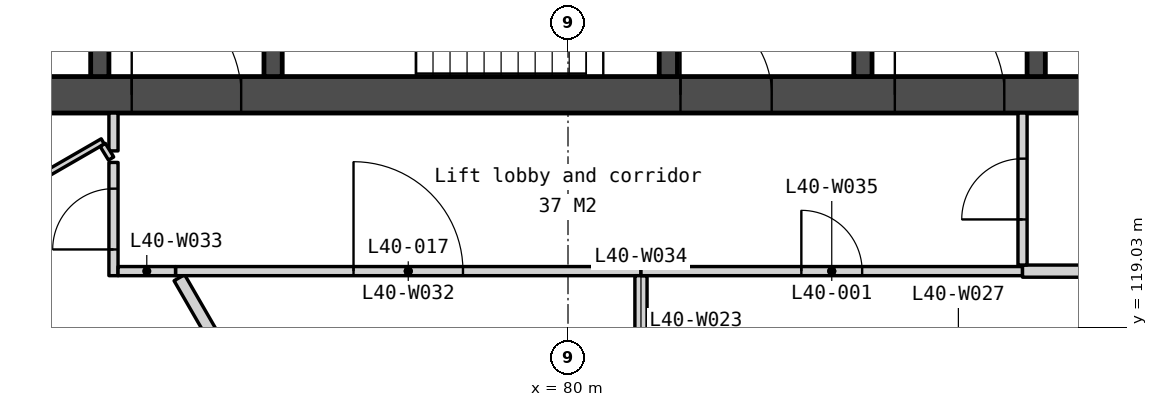
"""IFC4 building model, lengths in metres.
Left out: names, types, materials, properties, quantities, classifications, styles, units other than length and angle.
Written with IfcOpenShell. Run it as: python <this file> out.ifc"""

import sys

from ifc_helpers import new_model, si_unit, direction, frame, frame_2d, origin, place, context, subcontext, project, spatial, polyline, rectangle, outline, extrude, element, fill, save


model = new_model("IFC4")
c1 = context("Model", 3, precision=1e-05, world=origin(), true_north=direction((0.0, 1.0)))
c2 = subcontext(c1, "Body", "Model", "MODEL_VIEW")
j1 = project(units=[si_unit("LENGTHUNIT", "METRE"), si_unit("PLANEANGLEUNIT", "RADIAN")], contexts=[c1])
p1 = place(None, origin())
s1 = spatial("IfcSite", under=j1, at=p1, CompositionType="ELEMENT")
p2 = place(p1, origin())
s2 = spatial("IfcBuilding", under=s1, at=p2, CompositionType="ELEMENT")
p3 = place(p2, frame((0.0, 0.0, 159.8)))
s3 = spatial("IfcBuildingStorey", under=s2, at=p3, CompositionType="ELEMENT", Elevation=159.8)
p4 = place(p3, frame((69.0, 122.85, 0.0), z_axis=(0.0, 0.0, 1.0), x_axis=(1.0, 0.0, 0.0)))
e1 = element("IfcWall", 1, at=p4, inside=s3, PredefinedType="SOLIDWALL", context=c2, shape_type="SweptSolid", body=[
    extrude(rectangle(XDim=22.0, YDim=0.6, at=frame_2d((11.0, 0.0))), origin(), (0.0, 0.0, 1.0), 3.75),
])
p5 = place(p4, frame((16.375, 0.0, 0.0)))
e2 = element("IfcOpeningElement", 2, at=p5, cuts=e1, PredefinedType="OPENING", context=c2, shape_type="SweptSolid", body=[
    extrude(rectangle(XDim=1.8, YDim=2.1, at=frame_2d((0.9, 1.05))), frame((0.0, 0.31, 0.0), z_axis=(0.0, -1.0, 0.0), x_axis=(1.0, 0.0, 0.0)), (0.0, 0.0, 1.0), 0.62),
])
p6 = place(p4, frame((3.825, 0.0, 0.0)))
e3 = element("IfcOpeningElement", 3, at=p6, cuts=e1, PredefinedType="OPENING", context=c2, shape_type="SweptSolid", body=[
    extrude(rectangle(XDim=1.8, YDim=2.1, at=frame_2d((0.9, 1.05))), frame((0.0, 0.31, 0.0), z_axis=(0.0, -1.0, 0.0), x_axis=(1.0, 0.0, 0.0)), (0.0, 0.0, 1.0), 0.62),
])
p7 = place(p4, frame((12.85, 0.0, 0.0)))
e4 = element("IfcOpeningElement", 4, at=p7, cuts=e1, PredefinedType="OPENING", context=c2, shape_type="SweptSolid", body=[
    extrude(rectangle(XDim=1.5, YDim=2.1, at=frame_2d((0.75, 1.05))), frame((0.0, 0.31, 0.0), z_axis=(0.0, -1.0, 0.0), x_axis=(1.0, 0.0, 0.0)), (0.0, 0.0, 1.0), 0.62),
])
p8 = place(p3, frame((72.3, 133.95, 0.0), z_axis=(0.0, 0.0, 1.0), x_axis=(0.0, -1.0, 0.0)))
e5 = element("IfcWall", 5, at=p8, inside=s3, PredefinedType="SOLIDWALL", context=c2, shape_type="SweptSolid", body=[
    extrude(rectangle(XDim=10.8, YDim=0.3, at=frame_2d((5.4, 0.0))), origin(), (0.0, 0.0, 1.0), 3.75),
])
p9 = place(p8, frame((6.95, 0.0, 0.0)))
e6 = element("IfcOpeningElement", 6, at=p9, cuts=e5, PredefinedType="OPENING", context=c2, shape_type="SweptSolid", body=[
    extrude(rectangle(XDim=1.1, YDim=2.1, at=frame_2d((0.55, 1.05))), frame((0.0, 0.16, 0.0), z_axis=(0.0, -1.0, 0.0), x_axis=(1.0, 0.0, 0.0)), (0.0, 0.0, 1.0), 0.32),
])
p10 = place(p8, frame((9.35, 0.0, 0.0)))
e7 = element("IfcOpeningElement", 7, at=p10, cuts=e5, PredefinedType="OPENING", context=c2, shape_type="SweptSolid", body=[
    extrude(rectangle(XDim=0.9, YDim=2.1, at=frame_2d((0.45, 1.05))), frame((0.0, 0.16, 0.0), z_axis=(0.0, -1.0, 0.0), x_axis=(1.0, 0.0, 0.0)), (0.0, 0.0, 1.0), 0.32),
])
p11 = place(p8, frame((5.1, 0.0, 0.0)))
e8 = element("IfcOpeningElement", 8, at=p11, cuts=e5, PredefinedType="OPENING", context=c2, shape_type="SweptSolid", body=[
    extrude(rectangle(XDim=1.0, YDim=2.1, at=frame_2d((0.5, 1.05))), frame((0.0, 0.16, 0.0), z_axis=(0.0, -1.0, 0.0), x_axis=(1.0, 0.0, 0.0)), (0.0, 0.0, 1.0), 0.32),
])
p12 = place(p3, frame((75.15, 125.7, 0.0), z_axis=(0.0, 0.0, 1.0), x_axis=(0.0, -1.0, 0.0)))
e9 = element("IfcWall", 9, at=p12, inside=s3, PredefinedType="SOLIDWALL", context=c2, shape_type="SweptSolid", body=[
    extrude(rectangle(XDim=2.55, YDim=0.3, at=frame_2d((1.275, 0.0))), origin(), (0.0, 0.0, 1.0), 3.75),
])
p13 = place(p3, frame((81.65, 125.7, 0.0), z_axis=(0.0, 0.0, 1.0), x_axis=(0.0, -1.0, 0.0)))
e10 = element("IfcWall", 10, at=p13, inside=s3, PredefinedType="SOLIDWALL", context=c2, shape_type="SweptSolid", body=[
    extrude(rectangle(XDim=2.55, YDim=0.3, at=frame_2d((1.275, 0.0))), origin(), (0.0, 0.0, 1.0), 3.75),
])
p14 = place(p13, frame((0.75, 0.0, 0.0)))
e11 = element("IfcOpeningElement", 11, at=p14, cuts=e10, PredefinedType="OPENING", context=c2, shape_type="SweptSolid", body=[
    extrude(rectangle(XDim=1.0, YDim=2.1, at=frame_2d((0.5, 1.05))), frame((0.0, 0.16, 0.0), z_axis=(0.0, -1.0, 0.0), x_axis=(1.0, 0.0, 0.0)), (0.0, 0.0, 1.0), 0.32),
])
p15 = place(p3, frame((84.85, 125.85, 0.0), z_axis=(0.0, 0.0, 1.0), x_axis=(0.0, -1.0, 0.0)))
e12 = element("IfcWall", 12, at=p15, inside=s3, PredefinedType="SOLIDWALL", context=c2, shape_type="SweptSolid", body=[
    extrude(rectangle(XDim=2.7, YDim=0.3, at=frame_2d((1.35, 0.0))), origin(), (0.0, 0.0, 1.0), 3.75),
])
p16 = place(p3, frame((87.7, 133.95, 0.0), z_axis=(0.0, 0.0, 1.0), x_axis=(0.0, -1.0, 0.0)))
e13 = element("IfcWall", 13, at=p16, inside=s3, PredefinedType="SOLIDWALL", context=c2, shape_type="SweptSolid", body=[
    extrude(rectangle(XDim=10.8, YDim=0.3, at=frame_2d((5.4, 0.0))), origin(), (0.0, 0.0, 1.0), 3.75),
])
p17 = place(p16, frame((6.95, 0.0, 0.0)))
e14 = element("IfcOpeningElement", 14, at=p17, cuts=e13, PredefinedType="OPENING", context=c2, shape_type="SweptSolid", body=[
    extrude(rectangle(XDim=1.1, YDim=2.1, at=frame_2d((0.55, 1.05))), frame((0.0, 0.16, 0.0), z_axis=(0.0, -1.0, 0.0), x_axis=(1.0, 0.0, 0.0)), (0.0, 0.0, 1.0), 0.32),
])
p18 = place(p16, frame((5.1, 0.0, 0.0)))
e15 = element("IfcOpeningElement", 15, at=p18, cuts=e13, PredefinedType="OPENING", context=c2, shape_type="SweptSolid", body=[
    extrude(rectangle(XDim=1.0, YDim=2.1, at=frame_2d((0.5, 1.05))), frame((0.0, 0.16, 0.0), z_axis=(0.0, -1.0, 0.0), x_axis=(1.0, 0.0, 0.0)), (0.0, 0.0, 1.0), 0.32),
])
p19 = place(p16, frame((9.25, 0.0, 0.0)))
e16 = element("IfcOpeningElement", 16, at=p19, cuts=e13, PredefinedType="OPENING", context=c2, shape_type="SweptSolid", body=[
    extrude(rectangle(XDim=1.1, YDim=2.1, at=frame_2d((0.55, 1.05))), frame((0.0, 0.16, 0.0), z_axis=(0.0, -1.0, 0.0), x_axis=(1.0, 0.0, 0.0)), (0.0, 0.0, 1.0), 0.32),
])
p20 = place(p3, frame((57.652, 131.129, -0.15), z_axis=(0.0, 0.0, 1.0), x_axis=(0.499997369791, -0.866026922331, 0.0)))
e17 = element("IfcWall", 17, at=p20, inside=s3, PredefinedType="SOLIDWALL", context=c2, shape_type="SweptSolid", body=[
    extrude(outline(polyline([(40.486, 0.0), (40.486, 3.9), (0.0, 3.9), (0.0, 0.0), (40.486, 0.0)])), frame((0.0, 0.225, 0.0), z_axis=(0.0, -1.0, 0.0), x_axis=(1.0, 0.0, 0.0)), (0.0, 0.0, 1.0), 0.45),
])
p21 = place(p20, frame((3.011, 0.0, 0.95)))
e18 = element("IfcOpeningElement", 18, at=p21, cuts=e17, PredefinedType="OPENING", context=c2, shape_type="SweptSolid", body=[
    extrude(rectangle(XDim=1.8, YDim=2.2, at=frame_2d((0.9, 1.1))), frame((0.0, 0.235, 0.0), z_axis=(0.0, -1.0, 0.0), x_axis=(1.0, 0.0, 0.0)), (0.0, 0.0, 1.0), 0.47),
])
p22 = place(p20, frame((5.311, 0.0, 0.95)))
e19 = element("IfcOpeningElement", 19, at=p22, cuts=e17, PredefinedType="OPENING", context=c2, shape_type="SweptSolid", body=[
    extrude(rectangle(XDim=1.8, YDim=2.2, at=frame_2d((0.9, 1.1))), frame((0.0, 0.235, 0.0), z_axis=(0.0, -1.0, 0.0), x_axis=(1.0, 0.0, 0.0)), (0.0, 0.0, 1.0), 0.47),
])
p23 = place(p20, frame((13.132, 0.0, 0.95)))
e20 = element("IfcOpeningElement", 20, at=p23, cuts=e17, PredefinedType="OPENING", context=c2, shape_type="SweptSolid", body=[
    extrude(rectangle(XDim=1.8, YDim=2.2, at=frame_2d((0.9, 1.1))), frame((0.0, 0.235, 0.0), z_axis=(0.0, -1.0, 0.0), x_axis=(1.0, 0.0, 0.0)), (0.0, 0.0, 1.0), 0.47),
])
p24 = place(p20, frame((15.432, 0.0, 0.95)))
e21 = element("IfcOpeningElement", 21, at=p24, cuts=e17, PredefinedType="OPENING", context=c2, shape_type="SweptSolid", body=[
    extrude(rectangle(XDim=1.8, YDim=2.2, at=frame_2d((0.9, 1.1))), frame((0.0, 0.235, 0.0), z_axis=(0.0, -1.0, 0.0), x_axis=(1.0, 0.0, 0.0)), (0.0, 0.0, 1.0), 0.47),
])
p25 = place(p20, frame((23.254, 0.0, 0.95)))
e22 = element("IfcOpeningElement", 22, at=p25, cuts=e17, PredefinedType="OPENING", context=c2, shape_type="SweptSolid", body=[
    extrude(rectangle(XDim=1.8, YDim=2.2, at=frame_2d((0.9, 1.1))), frame((0.0, 0.235, 0.0), z_axis=(0.0, -1.0, 0.0), x_axis=(1.0, 0.0, 0.0)), (0.0, 0.0, 1.0), 0.47),
])
p26 = place(p20, frame((25.554, 0.0, 0.95)))
e23 = element("IfcOpeningElement", 23, at=p26, cuts=e17, PredefinedType="OPENING", context=c2, shape_type="SweptSolid", body=[
    extrude(rectangle(XDim=1.8, YDim=2.2, at=frame_2d((0.9, 1.1))), frame((0.0, 0.235, 0.0), z_axis=(0.0, -1.0, 0.0), x_axis=(1.0, 0.0, 0.0)), (0.0, 0.0, 1.0), 0.47),
])
p27 = place(p20, frame((33.375, 0.0, 0.95)))
e24 = element("IfcOpeningElement", 24, at=p27, cuts=e17, PredefinedType="OPENING", context=c2, shape_type="SweptSolid", body=[
    extrude(rectangle(XDim=1.8, YDim=2.2, at=frame_2d((0.9, 1.1))), frame((0.0, 0.235, 0.0), z_axis=(0.0, -1.0, 0.0), x_axis=(1.0, 0.0, 0.0)), (0.0, 0.0, 1.0), 0.47),
])
p28 = place(p20, frame((35.675, 0.0, 0.95)))
e25 = element("IfcOpeningElement", 25, at=p28, cuts=e17, PredefinedType="OPENING", context=c2, shape_type="SweptSolid", body=[
    extrude(rectangle(XDim=1.8, YDim=2.2, at=frame_2d((0.9, 1.1))), frame((0.0, 0.235, 0.0), z_axis=(0.0, -1.0, 0.0), x_axis=(1.0, 0.0, 0.0)), (0.0, 0.0, 1.0), 0.47),
])
p29 = place(p3, frame((82.105, 96.067, -0.15), z_axis=(0.0, 0.0, 1.0), x_axis=(0.499997369791, 0.866026922331, 0.0)))
e26 = element("IfcWall", 26, at=p29, inside=s3, PredefinedType="SOLIDWALL", context=c2, shape_type="SweptSolid", body=[
    extrude(outline(polyline([(40.486, 0.0), (40.486, 3.9), (0.0, 3.9), (0.0, 0.0), (40.486, 0.0)])), frame((0.0, 0.225, 0.0), z_axis=(0.0, -1.0, 0.0), x_axis=(1.0, 0.0, 0.0)), (0.0, 0.0, 1.0), 0.45),
])
p30 = place(p29, frame((3.011, 0.0, 0.95)))
e27 = element("IfcOpeningElement", 27, at=p30, cuts=e26, PredefinedType="OPENING", context=c2, shape_type="SweptSolid", body=[
    extrude(rectangle(XDim=1.8, YDim=2.2, at=frame_2d((0.9, 1.1))), frame((0.0, 0.235, 0.0), z_axis=(0.0, -1.0, 0.0), x_axis=(1.0, 0.0, 0.0)), (0.0, 0.0, 1.0), 0.47),
])
p31 = place(p29, frame((5.311, 0.0, 0.95)))
e28 = element("IfcOpeningElement", 28, at=p31, cuts=e26, PredefinedType="OPENING", context=c2, shape_type="SweptSolid", body=[
    extrude(rectangle(XDim=1.8, YDim=2.2, at=frame_2d((0.9, 1.1))), frame((0.0, 0.235, 0.0), z_axis=(0.0, -1.0, 0.0), x_axis=(1.0, 0.0, 0.0)), (0.0, 0.0, 1.0), 0.47),
])
p32 = place(p29, frame((13.132, 0.0, 0.95)))
e29 = element("IfcOpeningElement", 29, at=p32, cuts=e26, PredefinedType="OPENING", context=c2, shape_type="SweptSolid", body=[
    extrude(rectangle(XDim=1.8, YDim=2.2, at=frame_2d((0.9, 1.1))), frame((0.0, 0.235, 0.0), z_axis=(0.0, -1.0, 0.0), x_axis=(1.0, 0.0, 0.0)), (0.0, 0.0, 1.0), 0.47),
])
p33 = place(p29, frame((15.432, 0.0, 0.95)))
e30 = element("IfcOpeningElement", 30, at=p33, cuts=e26, PredefinedType="OPENING", context=c2, shape_type="SweptSolid", body=[
    extrude(rectangle(XDim=1.8, YDim=2.2, at=frame_2d((0.9, 1.1))), frame((0.0, 0.235, 0.0), z_axis=(0.0, -1.0, 0.0), x_axis=(1.0, 0.0, 0.0)), (0.0, 0.0, 1.0), 0.47),
])
p34 = place(p29, frame((23.254, 0.0, 0.95)))
e31 = element("IfcOpeningElement", 31, at=p34, cuts=e26, PredefinedType="OPENING", context=c2, shape_type="SweptSolid", body=[
    extrude(rectangle(XDim=1.8, YDim=2.2, at=frame_2d((0.9, 1.1))), frame((0.0, 0.235, 0.0), z_axis=(0.0, -1.0, 0.0), x_axis=(1.0, 0.0, 0.0)), (0.0, 0.0, 1.0), 0.47),
])
p35 = place(p29, frame((25.554, 0.0, 0.95)))
e32 = element("IfcOpeningElement", 32, at=p35, cuts=e26, PredefinedType="OPENING", context=c2, shape_type="SweptSolid", body=[
    extrude(rectangle(XDim=1.8, YDim=2.2, at=frame_2d((0.9, 1.1))), frame((0.0, 0.235, 0.0), z_axis=(0.0, -1.0, 0.0), x_axis=(1.0, 0.0, 0.0)), (0.0, 0.0, 1.0), 0.47),
])
p36 = place(p29, frame((33.375, 0.0, 0.95)))
e33 = element("IfcOpeningElement", 33, at=p36, cuts=e26, PredefinedType="OPENING", context=c2, shape_type="SweptSolid", body=[
    extrude(rectangle(XDim=1.8, YDim=2.2, at=frame_2d((0.9, 1.1))), frame((0.0, 0.235, 0.0), z_axis=(0.0, -1.0, 0.0), x_axis=(1.0, 0.0, 0.0)), (0.0, 0.0, 1.0), 0.47),
])
p37 = place(p29, frame((35.675, 0.0, 0.95)))
e34 = element("IfcOpeningElement", 34, at=p37, cuts=e26, PredefinedType="OPENING", context=c2, shape_type="SweptSolid", body=[
    extrude(rectangle(XDim=1.8, YDim=2.2, at=frame_2d((0.9, 1.1))), frame((0.0, 0.235, 0.0), z_axis=(0.0, -1.0, 0.0), x_axis=(1.0, 0.0, 0.0)), (0.0, 0.0, 1.0), 0.47),
])
p38 = place(p3, frame((73.608, 119.842, 0.0), z_axis=(0.0, 0.0, 1.0), x_axis=(0.50001949124, -0.86601415022, 0.0)))
e35 = element("IfcWall", 35, at=p38, inside=s3, PredefinedType="PARTITIONING", context=c2, shape_type="SweptSolid", body=[
    extrude(rectangle(XDim=2.49, YDim=0.2, at=frame_2d((1.245, 0.0))), origin(), (0.0, 0.0, 1.0), 3.75),
])
p39 = place(p3, frame((65.438, 118.093, 0.0), z_axis=(0.0, 0.0, 1.0), x_axis=(0.866026120082, 0.499998759335, 0.0)))
e36 = element("IfcWall", 36, at=p39, inside=s3, PredefinedType="PARTITIONING", context=c2, shape_type="SweptSolid", body=[
    extrude(rectangle(XDim=7.98, YDim=0.1, at=frame_2d((3.99, 0.0))), origin(), (0.0, 0.0, 1.0), 3.75),
])
p40 = place(p39, frame((3.54, 0.0, 0.0)))
e37 = element("IfcOpeningElement", 37, at=p40, cuts=e36, PredefinedType="OPENING", context=c2, shape_type="SweptSolid", body=[
    extrude(rectangle(XDim=0.9, YDim=2.1, at=frame_2d((0.45, 1.05))), frame((0.0, 0.06, 0.0), z_axis=(0.0, -1.0, 0.0), x_axis=(1.0, 0.0, 0.0)), (0.0, 0.0, 1.0), 0.12),
])
p41 = place(p3, frame((72.525, 119.875, 0.0), z_axis=(0.0, 0.0, 1.0), x_axis=(0.0, 1.0, 0.0)))
e38 = element("IfcWall", 38, at=p41, inside=s3, PredefinedType="PARTITIONING", context=c2, shape_type="SweptSolid", body=[
    extrude(rectangle(XDim=1.863, YDim=0.15, at=frame_2d((0.931, 0.0))), origin(), (0.0, 0.0, 1.0), 3.75),
])
p42 = place(p41, frame((0.431, 0.0, 0.0)))
e39 = element("IfcOpeningElement", 39, at=p42, cuts=e38, PredefinedType="OPENING", context=c2, shape_type="SweptSolid", body=[
    extrude(rectangle(XDim=1.0, YDim=2.1, at=frame_2d((0.5, 1.05))), frame((0.0, 0.085, 0.0), z_axis=(0.0, -1.0, 0.0), x_axis=(1.0, 0.0, 0.0)), (0.0, 0.0, 1.0), 0.17),
])
p43 = place(p3, frame((73.545, 119.95, 0.0), z_axis=(0.0, 0.0, 1.0), x_axis=(1.0, 0.0, 0.0)))
e40 = element("IfcWall", 40, at=p43, inside=s3, PredefinedType="PARTITIONING", context=c2, shape_type="SweptSolid", body=[
    extrude(rectangle(XDim=7.655, YDim=0.15, at=frame_2d((3.827, 0.0))), origin(), (0.0, 0.0, 1.0), 3.75),
])
p44 = place(p43, frame((2.927, 0.0, 0.0)))
e41 = element("IfcOpeningElement", 41, at=p44, cuts=e40, PredefinedType="OPENING", context=c2, shape_type="SweptSolid", body=[
    extrude(rectangle(XDim=1.8, YDim=2.1, at=frame_2d((0.9, 1.05))), frame((0.0, 0.085, 0.0), z_axis=(0.0, -1.0, 0.0), x_axis=(1.0, 0.0, 0.0)), (0.0, 0.0, 1.0), 0.17),
])
p45 = place(p3, frame((72.6, 119.95, 0.0), z_axis=(0.0, 0.0, 1.0), x_axis=(1.0, 0.0, 0.0)))
e42 = element("IfcWall", 42, at=p45, inside=s3, PredefinedType="PARTITIONING", context=c2, shape_type="SweptSolid", body=[
    extrude(rectangle(XDim=0.945, YDim=0.15, at=frame_2d((0.473, 0.0))), origin(), (0.0, 0.0, 1.0), 3.75),
])
p46 = place(p3, frame((81.2, 117.75, 0.0), z_axis=(0.0, 0.0, 1.0), x_axis=(0.0, 1.0, 0.0)))
e43 = element("IfcWall", 43, at=p46, inside=s3, PredefinedType="PARTITIONING", context=c2, shape_type="SweptSolid", body=[
    extrude(rectangle(XDim=2.125, YDim=0.2, at=frame_2d((1.062, 0.0))), origin(), (0.0, 0.0, 1.0), 3.75),
])
p47 = place(p3, frame((81.2, 119.95, 0.0), z_axis=(0.0, 0.0, 1.0), x_axis=(1.0, 0.0, 0.0)))
e44 = element("IfcWall", 44, at=p47, inside=s3, PredefinedType="PARTITIONING", context=c2, shape_type="SweptSolid", body=[
    extrude(rectangle(XDim=6.275, YDim=0.15, at=frame_2d((3.138, 0.0))), origin(), (0.0, 0.0, 1.0), 3.75),
])
p48 = place(p47, frame((2.637, 0.0, 0.0)))
e45 = element("IfcOpeningElement", 45, at=p48, cuts=e44, PredefinedType="OPENING", context=c2, shape_type="SweptSolid", body=[
    extrude(rectangle(XDim=1.0, YDim=2.1, at=frame_2d((0.5, 1.05))), frame((0.0, 0.085, 0.0), z_axis=(0.0, -1.0, 0.0), x_axis=(1.0, 0.0, 0.0)), (0.0, 0.0, 1.0), 0.17),
])
p49 = place(p3, frame((87.475, 119.95, 0.0), z_axis=(0.0, 0.0, 1.0), x_axis=(0.999999723197, -0.000744047413, 0.0)))
e46 = element("IfcWall", 46, at=p49, inside=s3, PredefinedType="PARTITIONING", context=c2, shape_type="SweptSolid", body=[
    extrude(rectangle(XDim=2.625, YDim=0.2, at=frame_2d((1.312, 0.0))), origin(), (0.0, 0.0, 1.0), 3.75),
])
p50 = place(p3, frame((72.525, 121.927, 0.0), z_axis=(0.0, 0.0, 1.0), x_axis=(0.0, 1.0, 0.0)))
e47 = element("IfcWall", 47, at=p50, inside=s3, PredefinedType="PARTITIONING", context=c2, shape_type="SweptSolid", body=[
    extrude(rectangle(XDim=0.623, YDim=0.15, at=frame_2d((0.311, 0.0))), origin(), (0.0, 0.0, 1.0), 3.75),
])
p51 = place(p3, frame((72.349, 122.025, 0.0), z_axis=(0.0, 0.0, 1.0), x_axis=(0.521863852021, -0.853028791984, 0.0)))
e48 = element("IfcWall", 48, at=p51, inside=s3, PredefinedType="PARTITIONING", context=c2, shape_type="SweptSolid", body=[
    extrude(rectangle(XDim=0.262, YDim=0.1, at=frame_2d((0.131, 0.0))), origin(), (0.0, 0.0, 1.0), 3.75),
])
p52 = place(p3, frame((87.475, 120.05, 0.0), z_axis=(0.0, 0.0, 1.0), x_axis=(0.0, 1.0, 0.0)))
e49 = element("IfcWall", 49, at=p52, inside=s3, PredefinedType="PARTITIONING", context=c2, shape_type="SweptSolid", body=[
    extrude(rectangle(XDim=2.5, YDim=0.15, at=frame_2d((1.25, 0.0))), origin(), (0.0, 0.0, 1.0), 3.75),
])
p53 = place(p52, frame((0.75, 0.0, 0.0)))
e50 = element("IfcOpeningElement", 50, at=p53, cuts=e49, PredefinedType="OPENING", context=c2, shape_type="SweptSolid", body=[
    extrude(rectangle(XDim=1.0, YDim=2.1, at=frame_2d((0.5, 1.05))), frame((0.0, 0.085, 0.0), z_axis=(0.0, -1.0, 0.0), x_axis=(1.0, 0.0, 0.0)), (0.0, 0.0, 1.0), 0.17),
])
p54 = place(p5, origin())
e51 = element("IfcDoor", 51, at=p54, inside=s3, OperationType="DOUBLE_DOOR_DOUBLE_SWING", PredefinedType="DOOR", context=c2, shape_type="SweptSolid", body=[
    extrude(rectangle(XDim=1.8, YDim=2.1, at=frame_2d((0.9, 1.05))), frame((0.0, 0.025, 0.0), z_axis=(0.0, -1.0, 0.0), x_axis=(1.0, 0.0, 0.0)), (0.0, 0.0, 1.0), 0.05),
])
fill(e2, e51)
p55 = place(p6, origin())
e52 = element("IfcDoor", 52, at=p55, inside=s3, OperationType="DOUBLE_DOOR_DOUBLE_SWING", PredefinedType="DOOR", context=c2, shape_type="SweptSolid", body=[
    extrude(rectangle(XDim=1.8, YDim=2.1, at=frame_2d((0.9, 1.05))), frame((0.0, 0.025, 0.0), z_axis=(0.0, -1.0, 0.0), x_axis=(1.0, 0.0, 0.0)), (0.0, 0.0, 1.0), 0.05),
])
fill(e3, e52)
p56 = place(p7, origin())
e53 = element("IfcDoor", 53, at=p56, inside=s3, OperationType="DOUBLE_DOOR_DOUBLE_SWING", PredefinedType="DOOR", context=c2, shape_type="SweptSolid", body=[
    extrude(rectangle(XDim=1.5, YDim=2.1, at=frame_2d((0.75, 1.05))), frame((0.0, 0.025, 0.0), z_axis=(0.0, -1.0, 0.0), x_axis=(1.0, 0.0, 0.0)), (0.0, 0.0, 1.0), 0.05),
])
fill(e4, e53)
p57 = place(p48, origin())
e54 = element("IfcDoor", 54, at=p57, inside=s3, OperationType="SINGLE_SWING_LEFT", PredefinedType="DOOR", context=c2, shape_type="SweptSolid", body=[
    extrude(rectangle(XDim=1.0, YDim=2.1, at=frame_2d((0.5, 1.05))), frame((0.0, 0.025, 0.0), z_axis=(0.0, -1.0, 0.0), x_axis=(1.0, 0.0, 0.0)), (0.0, 0.0, 1.0), 0.05),
])
fill(e45, e54)
p58 = place(p42, origin())
e55 = element("IfcDoor", 55, at=p58, inside=s3, OperationType="SINGLE_SWING_LEFT", PredefinedType="DOOR", context=c2, shape_type="SweptSolid", body=[
    extrude(rectangle(XDim=1.0, YDim=2.1, at=frame_2d((0.5, 1.05))), frame((0.0, 0.025, 0.0), z_axis=(0.0, -1.0, 0.0), x_axis=(1.0, 0.0, 0.0)), (0.0, 0.0, 1.0), 0.05),
])
fill(e39, e55)
p59 = place(p53, origin())
e56 = element("IfcDoor", 56, at=p59, inside=s3, OperationType="SINGLE_SWING_LEFT", PredefinedType="DOOR", context=c2, shape_type="SweptSolid", body=[
    extrude(rectangle(XDim=1.0, YDim=2.1, at=frame_2d((0.5, 1.05))), frame((0.0, 0.025, 0.0), z_axis=(0.0, -1.0, 0.0), x_axis=(1.0, 0.0, 0.0)), (0.0, 0.0, 1.0), 0.05),
])
fill(e50, e56)
p60 = place(p44, origin())
e57 = element("IfcDoor", 57, at=p60, inside=s3, OperationType="SINGLE_SWING_LEFT", PredefinedType="DOOR", context=c2, shape_type="SweptSolid", body=[
    extrude(rectangle(XDim=1.8, YDim=2.1, at=frame_2d((0.9, 1.05))), frame((0.0, 0.025, 0.0), z_axis=(0.0, -1.0, 0.0), x_axis=(1.0, 0.0, 0.0)), (0.0, 0.0, 1.0), 0.05),
])
fill(e41, e57)
save(model, sys.argv[1])
